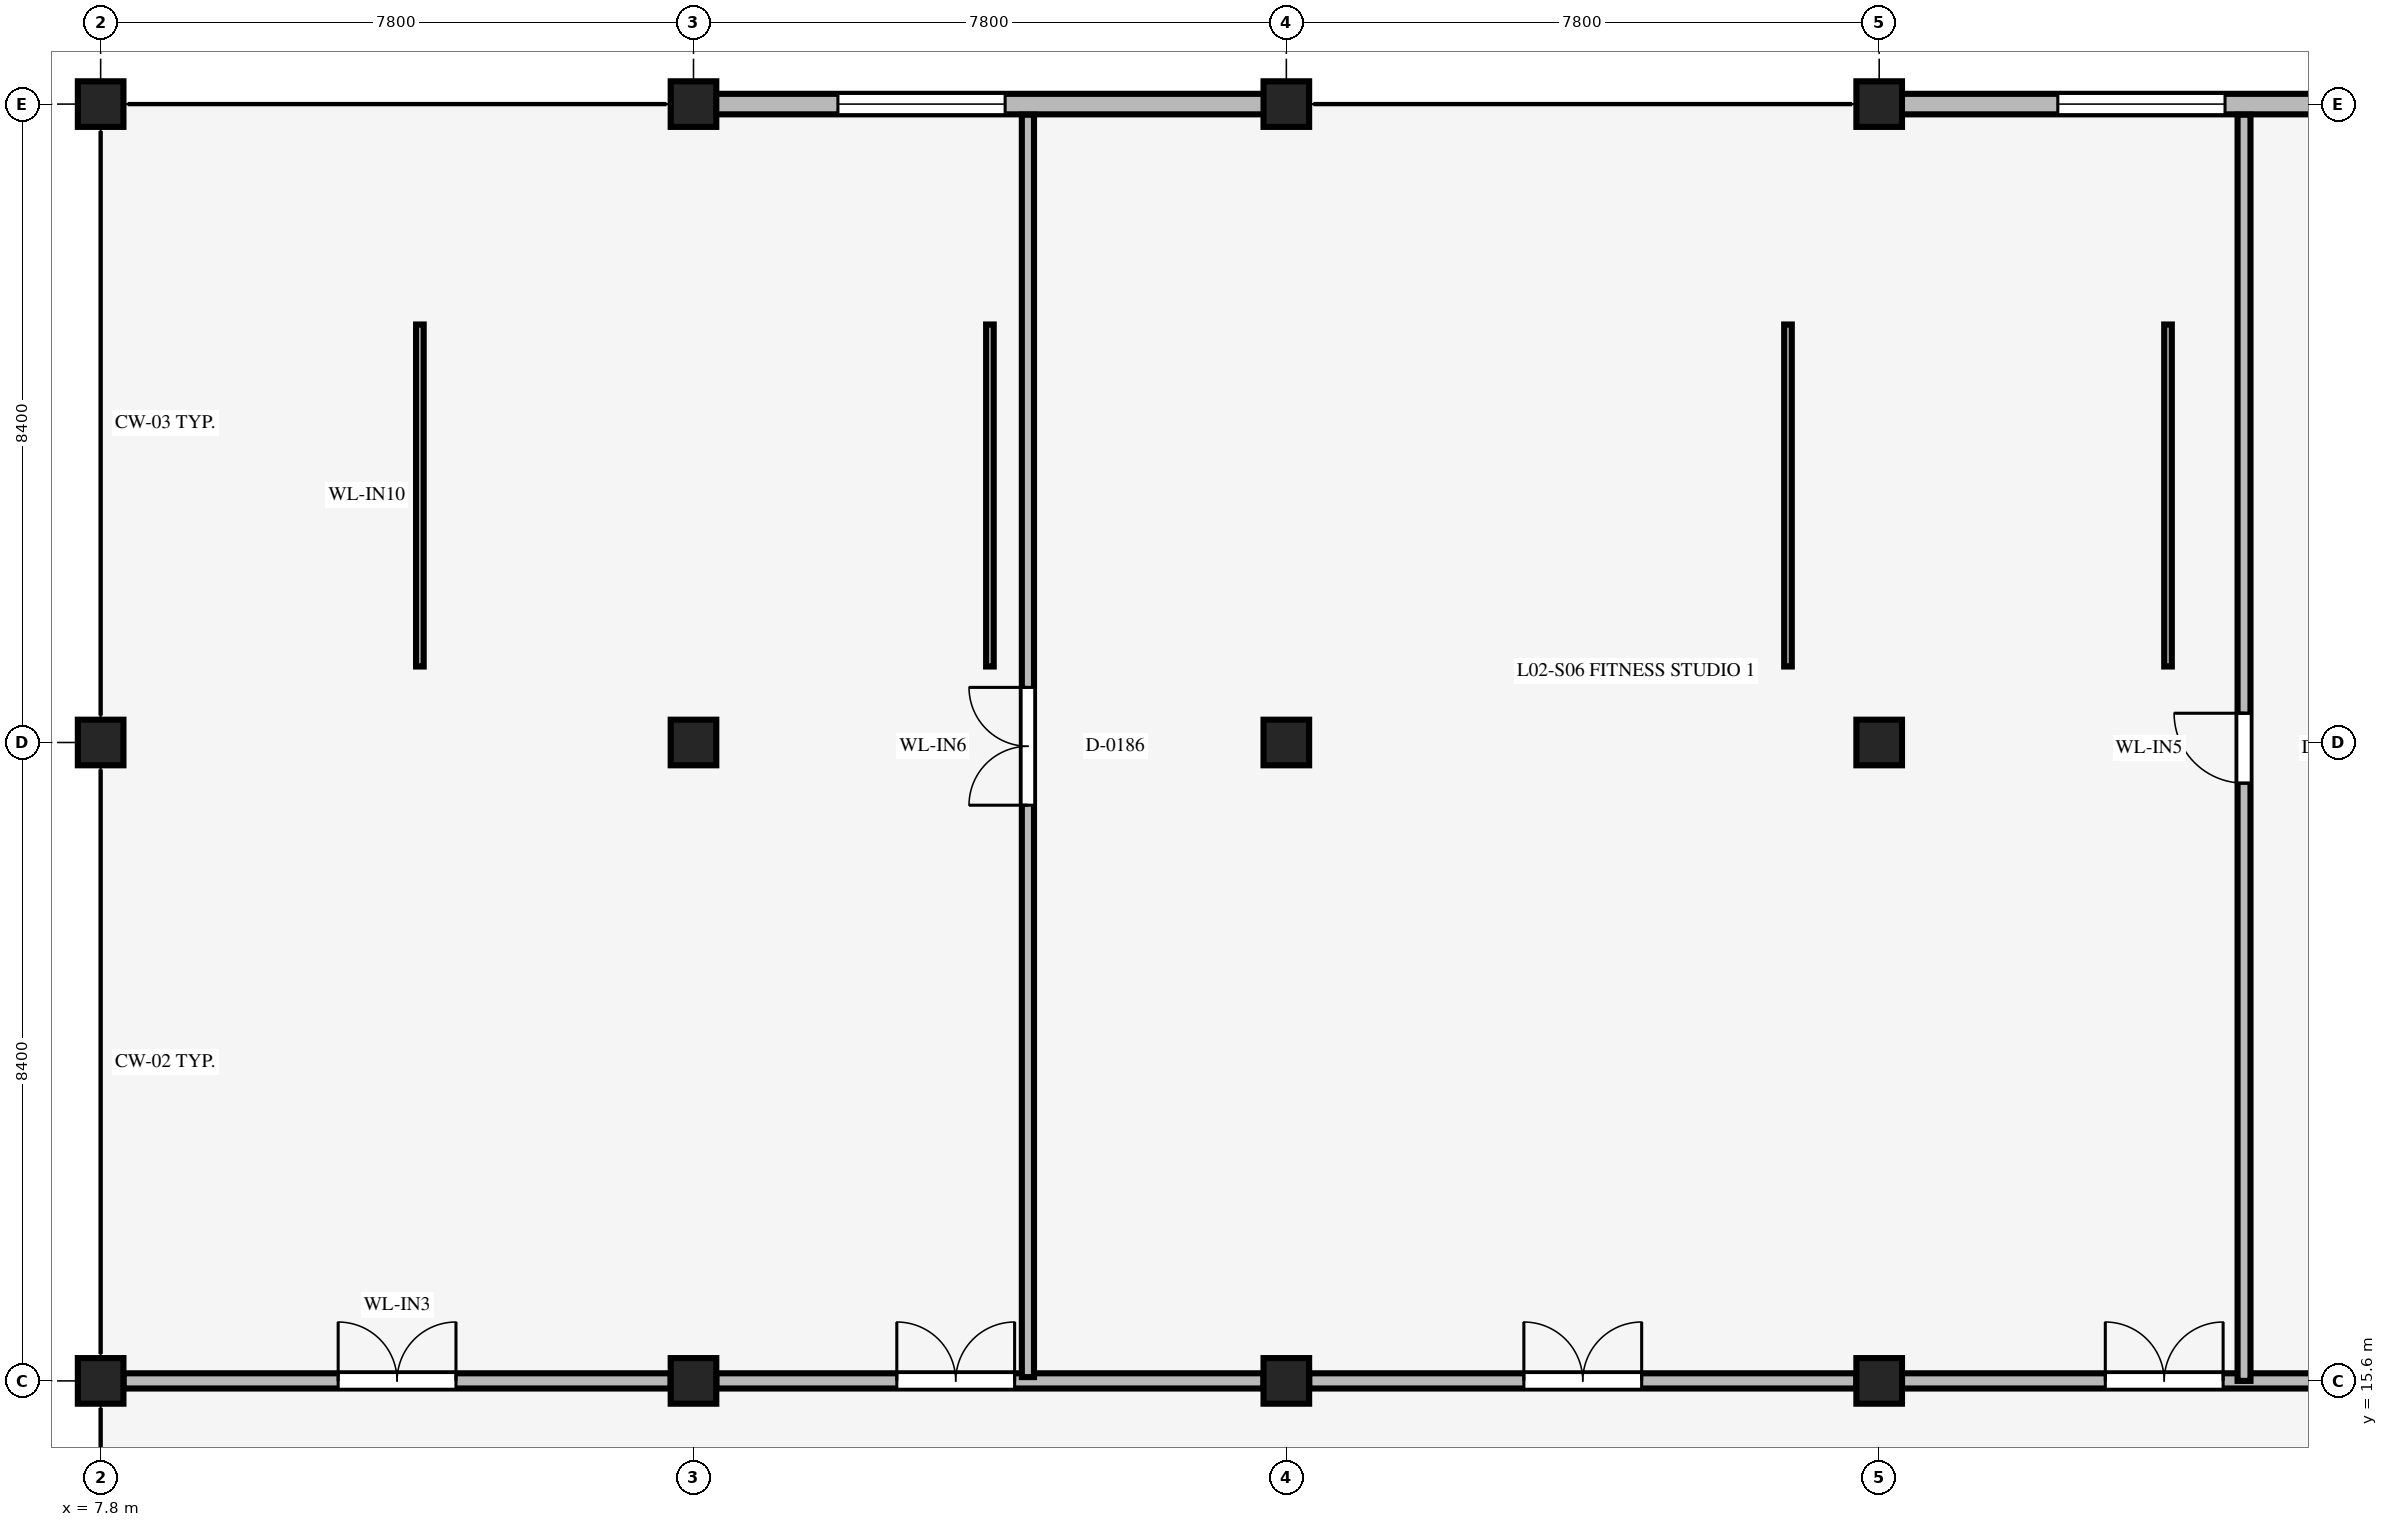
"""IFC4 building model, lengths in metres.
Left out: names, types, materials, properties, quantities, classifications, styles, units other than length and angle.
Written with IfcOpenShell. Run it as: python <this file> out.ifc"""

import sys

from ifc_helpers import new_model, si_unit, direction, frame, frame_2d, origin, origin_2d, place, context, subcontext, project, spatial, rectangle, extrude, element, fill, save


model = new_model("IFC4")
c1 = context("Model", 3, precision=1e-05, world=origin(), true_north=direction((0.0, 1.0)))
c2 = subcontext(c1, "Body", "Model", "MODEL_VIEW")
j1 = project(units=[si_unit("LENGTHUNIT", "METRE"), si_unit("PLANEANGLEUNIT", "RADIAN")], contexts=[c1])
p1 = place(None, origin())
s1 = spatial("IfcSite", under=j1, at=p1, CompositionType="ELEMENT")
p2 = place(p1, origin())
s2 = spatial("IfcBuilding", under=s1, at=p2, CompositionType="ELEMENT")
p3 = place(p2, frame((0.0, 0.0, 12.0)))
s3 = spatial("IfcBuildingStorey", under=s2, at=p3, CompositionType="ELEMENT", Elevation=12.0)
for number, where, z_axis, x_axis in (
    (1, (7.8, 15.6, 0.0), (0.0, 0.0, 1.0), (1.0, 0.0, 0.0)),
    (2, (7.8, 24.0, 0.0), (0.0, 0.0, 1.0), (1.0, 0.0, 0.0)),
    (3, (7.8, 32.4, 0.0), (0.0, 0.0, 1.0), (1.0, 0.0, 0.0)),
    (4, (15.6, 15.6, 0.0), (0.0, 0.0, 1.0), (1.0, 0.0, 0.0)),
    (5, (15.6, 24.0, 0.0), (0.0, 0.0, 1.0), (1.0, 0.0, 0.0)),
    (6, (15.6, 32.4, 0.0), (0.0, 0.0, 1.0), (1.0, 0.0, 0.0)),
    (7, (23.4, 15.6, 0.0), (0.0, 0.0, 1.0), (1.0, 0.0, 0.0)),
    (8, (23.4, 24.0, 0.0), (0.0, 0.0, 1.0), (1.0, 0.0, 0.0)),
    (9, (23.4, 32.4, 0.0), (0.0, 0.0, 1.0), (1.0, 0.0, 0.0)),
    (10, (31.2, 15.6, 0.0), (0.0, 0.0, 1.0), (1.0, 0.0, 0.0)),
    (11, (31.2, 24.0, 0.0), (0.0, 0.0, 1.0), (1.0, 0.0, 0.0)),
    (12, (31.2, 32.4, 0.0), (0.0, 0.0, 1.0), (1.0, 0.0, 0.0)),
):
    element("IfcColumn", number, at=place(p3, frame(where, z_axis=z_axis, x_axis=x_axis)), inside=s3, PredefinedType="COLUMN", context=c2, shape_type="SweptSolid", body=[
        extrude(rectangle(XDim=0.6, YDim=0.6, at=origin_2d()), origin(), (0.0, 0.0, 1.0), 3.9),
    ])
p4 = place(p3, frame((15.89, 32.4, 0.0), z_axis=(0.0, 0.0, 1.0), x_axis=(1.0, 0.0, 0.0)))
e13 = element("IfcWall", 13, at=p4, inside=s3, PredefinedType="STANDARD", context=c2, shape_type="SweptSolid", body=[
    extrude(rectangle(XDim=7.22, YDim=0.27, at=frame_2d((3.61, 0.0))), origin(), (0.0, 0.0, 1.0), 3.271),
])
p5 = place(p4, frame((1.61, 0.0, 0.95)))
e14 = element("IfcOpeningElement", 14, at=p5, cuts=e13, PredefinedType="OPENING", context=c2, shape_type="SweptSolid", body=[
    extrude(rectangle(XDim=2.2, YDim=1.9, at=frame_2d((1.1, 0.95))), frame((0.0, 0.145, 0.0), z_axis=(0.0, -1.0, 0.0), x_axis=(1.0, 0.0, 0.0)), (0.0, 0.0, 1.0), 0.29),
])
p6 = place(p3, frame((31.49, 32.4, 0.0), z_axis=(0.0, 0.0, 1.0), x_axis=(1.0, 0.0, 0.0)))
e15 = element("IfcWall", 15, at=p6, inside=s3, PredefinedType="STANDARD", context=c2, shape_type="SweptSolid", body=[
    extrude(rectangle(XDim=7.22, YDim=0.27, at=frame_2d((3.61, 0.0))), origin(), (0.0, 0.0, 1.0), 3.271),
])
p7 = place(p6, frame((2.06, 0.0, 0.95)))
e16 = element("IfcOpeningElement", 16, at=p7, cuts=e15, PredefinedType="OPENING", context=c2, shape_type="SweptSolid", body=[
    extrude(rectangle(XDim=2.2, YDim=1.9, at=frame_2d((1.1, 0.95))), frame((0.0, 0.145, 0.0), z_axis=(0.0, -1.0, 0.0), x_axis=(1.0, 0.0, 0.0)), (0.0, 0.0, 1.0), 0.29),
])
p8 = place(p3, frame((8.1, 15.6, 0.0), z_axis=(0.0, 0.0, 1.0), x_axis=(1.0, 0.0, 0.0)))
e17 = element("IfcWall", 17, at=p8, inside=s3, PredefinedType="STANDARD", context=c2, shape_type="SweptSolid", body=[
    extrude(rectangle(XDim=7.2, YDim=0.2, at=frame_2d((3.6, 0.0))), origin(), (0.0, 0.0, 1.0), 2.971),
])
p9 = place(p8, frame((2.825, 0.0, 0.0)))
e18 = element("IfcOpeningElement", 18, at=p9, cuts=e17, PredefinedType="OPENING", context=c2, shape_type="SweptSolid", body=[
    extrude(rectangle(XDim=1.55, YDim=2.25, at=frame_2d((0.775, 1.125))), frame((0.0, 0.11, 0.0), z_axis=(0.0, -1.0, 0.0), x_axis=(1.0, 0.0, 0.0)), (0.0, 0.0, 1.0), 0.22),
])
p10 = place(p3, frame((15.9, 15.6, 0.0), z_axis=(0.0, 0.0, 1.0), x_axis=(1.0, 0.0, 0.0)))
e19 = element("IfcWall", 19, at=p10, inside=s3, PredefinedType="STANDARD", context=c2, shape_type="SweptSolid", body=[
    extrude(rectangle(XDim=7.2, YDim=0.2, at=frame_2d((3.6, 0.0))), origin(), (0.0, 0.0, 1.0), 2.971),
])
p11 = place(p10, frame((2.375, 0.0, 0.0)))
e20 = element("IfcOpeningElement", 20, at=p11, cuts=e19, PredefinedType="OPENING", context=c2, shape_type="SweptSolid", body=[
    extrude(rectangle(XDim=1.55, YDim=2.25, at=frame_2d((0.775, 1.125))), frame((0.0, 0.11, 0.0), z_axis=(0.0, -1.0, 0.0), x_axis=(1.0, 0.0, 0.0)), (0.0, 0.0, 1.0), 0.22),
])
p12 = place(p3, frame((23.7, 15.6, 0.0), z_axis=(0.0, 0.0, 1.0), x_axis=(1.0, 0.0, 0.0)))
e21 = element("IfcWall", 21, at=p12, inside=s3, PredefinedType="STANDARD", context=c2, shape_type="SweptSolid", body=[
    extrude(rectangle(XDim=7.2, YDim=0.2, at=frame_2d((3.6, 0.0))), origin(), (0.0, 0.0, 1.0), 2.971),
])
p13 = place(p12, frame((2.825, 0.0, 0.0)))
e22 = element("IfcOpeningElement", 22, at=p13, cuts=e21, PredefinedType="OPENING", context=c2, shape_type="SweptSolid", body=[
    extrude(rectangle(XDim=1.55, YDim=2.25, at=frame_2d((0.775, 1.125))), frame((0.0, 0.11, 0.0), z_axis=(0.0, -1.0, 0.0), x_axis=(1.0, 0.0, 0.0)), (0.0, 0.0, 1.0), 0.22),
])
p14 = place(p3, frame((31.5, 15.6, 0.0), z_axis=(0.0, 0.0, 1.0), x_axis=(1.0, 0.0, 0.0)))
e23 = element("IfcWall", 23, at=p14, inside=s3, PredefinedType="STANDARD", context=c2, shape_type="SweptSolid", body=[
    extrude(rectangle(XDim=7.2, YDim=0.2, at=frame_2d((3.6, 0.0))), origin(), (0.0, 0.0, 1.0), 2.971),
])
p15 = place(p14, frame((2.675, 0.0, 0.0)))
e24 = element("IfcOpeningElement", 24, at=p15, cuts=e23, PredefinedType="OPENING", context=c2, shape_type="SweptSolid", body=[
    extrude(rectangle(XDim=1.55, YDim=2.25, at=frame_2d((0.775, 1.125))), frame((0.0, 0.11, 0.0), z_axis=(0.0, -1.0, 0.0), x_axis=(1.0, 0.0, 0.0)), (0.0, 0.0, 1.0), 0.22),
])
p16 = place(p3, frame((36.0, 15.6, 0.0), z_axis=(0.0, 0.0, 1.0), x_axis=(0.0, 1.0, 0.0)))
e25 = element("IfcWall", 25, at=p16, inside=s3, PredefinedType="STANDARD", context=c2, shape_type="SweptSolid", body=[
    extrude(rectangle(XDim=16.66, YDim=0.17, at=frame_2d((8.33, 0.0))), origin(), (0.0, 0.0, 1.0), 3.05),
])
p17 = place(p16, frame((7.865, 0.0, 0.0)))
e26 = element("IfcOpeningElement", 26, at=p17, cuts=e25, PredefinedType="OPENING", context=c2, shape_type="SweptSolid", body=[
    extrude(rectangle(XDim=0.92, YDim=2.15, at=frame_2d((0.46, 1.075))), frame((0.0, 0.095, 0.0), z_axis=(0.0, -1.0, 0.0), x_axis=(1.0, 0.0, 0.0)), (0.0, 0.0, 1.0), 0.19),
])
p18 = place(p3, frame((20.0, 15.65, 0.0), z_axis=(0.0, 0.0, 1.0), x_axis=(0.0, 1.0, 0.0)))
e27 = element("IfcWall", 27, at=p18, inside=s3, PredefinedType="STANDARD", context=c2, shape_type="SweptSolid", body=[
    extrude(rectangle(XDim=16.61, YDim=0.16, at=frame_2d((8.305, 0.0))), origin(), (0.0, 0.0, 1.0), 3.05),
])
p19 = place(p18, frame((7.525, 0.0, 0.0)))
e28 = element("IfcOpeningElement", 28, at=p19, cuts=e27, PredefinedType="OPENING", context=c2, shape_type="SweptSolid", body=[
    extrude(rectangle(XDim=1.55, YDim=2.25, at=frame_2d((0.775, 1.125))), frame((0.0, 0.09, 0.0), z_axis=(0.0, -1.0, 0.0), x_axis=(1.0, 0.0, 0.0)), (0.0, 0.0, 1.0), 0.18),
])
for number, where, z_axis, x_axis in (
    (29, (12.0, 25.0, 0.0), (0.0, 0.0, 1.0), (0.0, 1.0, 0.0)),
    (30, (19.5, 25.0, 0.0), (0.0, 0.0, 1.0), (0.0, 1.0, 0.0)),
    (31, (30.0, 25.0, 0.0), (0.0, 0.0, 1.0), (0.0, 1.0, 0.0)),
    (32, (35.0, 25.0, 0.0), (0.0, 0.0, 1.0), (0.0, 1.0, 0.0)),
):
    element("IfcWall", number, at=place(p3, frame(where, z_axis=z_axis, x_axis=x_axis)), inside=s3, PredefinedType="STANDARD", context=c2, shape_type="SweptSolid", body=[
        extrude(rectangle(XDim=4.5, YDim=0.1, at=frame_2d((2.25, 0.0))), origin(), (0.0, 0.0, 1.0), 3.05),
    ])
p20 = place(p5, origin())
e33 = element("IfcWindow", 33, at=p20, inside=s3, PartitioningType="SINGLE_PANEL", PredefinedType="WINDOW", context=c2, shape_type="SweptSolid", body=[
    extrude(rectangle(XDim=2.2, YDim=1.9, at=frame_2d((1.1, 0.95))), frame((0.0, 0.03, 0.0), z_axis=(0.0, -1.0, 0.0), x_axis=(1.0, 0.0, 0.0)), (0.0, 0.0, 1.0), 0.06),
])
fill(e14, e33)
p21 = place(p7, origin())
e34 = element("IfcWindow", 34, at=p21, inside=s3, PartitioningType="SINGLE_PANEL", PredefinedType="WINDOW", context=c2, shape_type="SweptSolid", body=[
    extrude(rectangle(XDim=2.2, YDim=1.9, at=frame_2d((1.1, 0.95))), frame((0.0, 0.03, 0.0), z_axis=(0.0, -1.0, 0.0), x_axis=(1.0, 0.0, 0.0)), (0.0, 0.0, 1.0), 0.06),
])
fill(e16, e34)
p22 = place(p9, origin())
e35 = element("IfcDoor", 35, at=p22, inside=s3, OperationType="DOUBLE_DOOR_SINGLE_SWING", PredefinedType="DOOR", context=c2, shape_type="SweptSolid", body=[
    extrude(rectangle(XDim=1.55, YDim=2.25, at=frame_2d((0.775, 1.125))), frame((0.0, 0.025, 0.0), z_axis=(0.0, -1.0, 0.0), x_axis=(1.0, 0.0, 0.0)), (0.0, 0.0, 1.0), 0.05),
])
fill(e18, e35)
p23 = place(p11, origin())
e36 = element("IfcDoor", 36, at=p23, inside=s3, OperationType="DOUBLE_DOOR_SINGLE_SWING", PredefinedType="DOOR", context=c2, shape_type="SweptSolid", body=[
    extrude(rectangle(XDim=1.55, YDim=2.25, at=frame_2d((0.775, 1.125))), frame((0.0, 0.025, 0.0), z_axis=(0.0, -1.0, 0.0), x_axis=(1.0, 0.0, 0.0)), (0.0, 0.0, 1.0), 0.05),
])
fill(e20, e36)
p24 = place(p13, origin())
e37 = element("IfcDoor", 37, at=p24, inside=s3, OperationType="DOUBLE_DOOR_SINGLE_SWING", PredefinedType="DOOR", context=c2, shape_type="SweptSolid", body=[
    extrude(rectangle(XDim=1.55, YDim=2.25, at=frame_2d((0.775, 1.125))), frame((0.0, 0.025, 0.0), z_axis=(0.0, -1.0, 0.0), x_axis=(1.0, 0.0, 0.0)), (0.0, 0.0, 1.0), 0.05),
])
fill(e22, e37)
p25 = place(p15, origin())
e38 = element("IfcDoor", 38, at=p25, inside=s3, OperationType="DOUBLE_DOOR_SINGLE_SWING", PredefinedType="DOOR", context=c2, shape_type="SweptSolid", body=[
    extrude(rectangle(XDim=1.55, YDim=2.25, at=frame_2d((0.775, 1.125))), frame((0.0, 0.025, 0.0), z_axis=(0.0, -1.0, 0.0), x_axis=(1.0, 0.0, 0.0)), (0.0, 0.0, 1.0), 0.05),
])
fill(e24, e38)
p26 = place(p17, origin())
e39 = element("IfcDoor", 39, at=p26, inside=s3, OperationType="SINGLE_SWING_RIGHT", PredefinedType="DOOR", context=c2, shape_type="SweptSolid", body=[
    extrude(rectangle(XDim=0.92, YDim=2.15, at=frame_2d((0.46, 1.075))), frame((0.0, 0.025, 0.0), z_axis=(0.0, -1.0, 0.0), x_axis=(1.0, 0.0, 0.0)), (0.0, 0.0, 1.0), 0.05),
])
fill(e26, e39)
p27 = place(p19, origin())
e40 = element("IfcDoor", 40, at=p27, inside=s3, OperationType="DOUBLE_DOOR_SINGLE_SWING", PredefinedType="DOOR", context=c2, shape_type="SweptSolid", body=[
    extrude(rectangle(XDim=1.55, YDim=2.25, at=frame_2d((0.775, 1.125))), frame((0.0, 0.025, 0.0), z_axis=(0.0, -1.0, 0.0), x_axis=(1.0, 0.0, 0.0)), (0.0, 0.0, 1.0), 0.05),
])
fill(e28, e40)
save(model, sys.argv[1])
